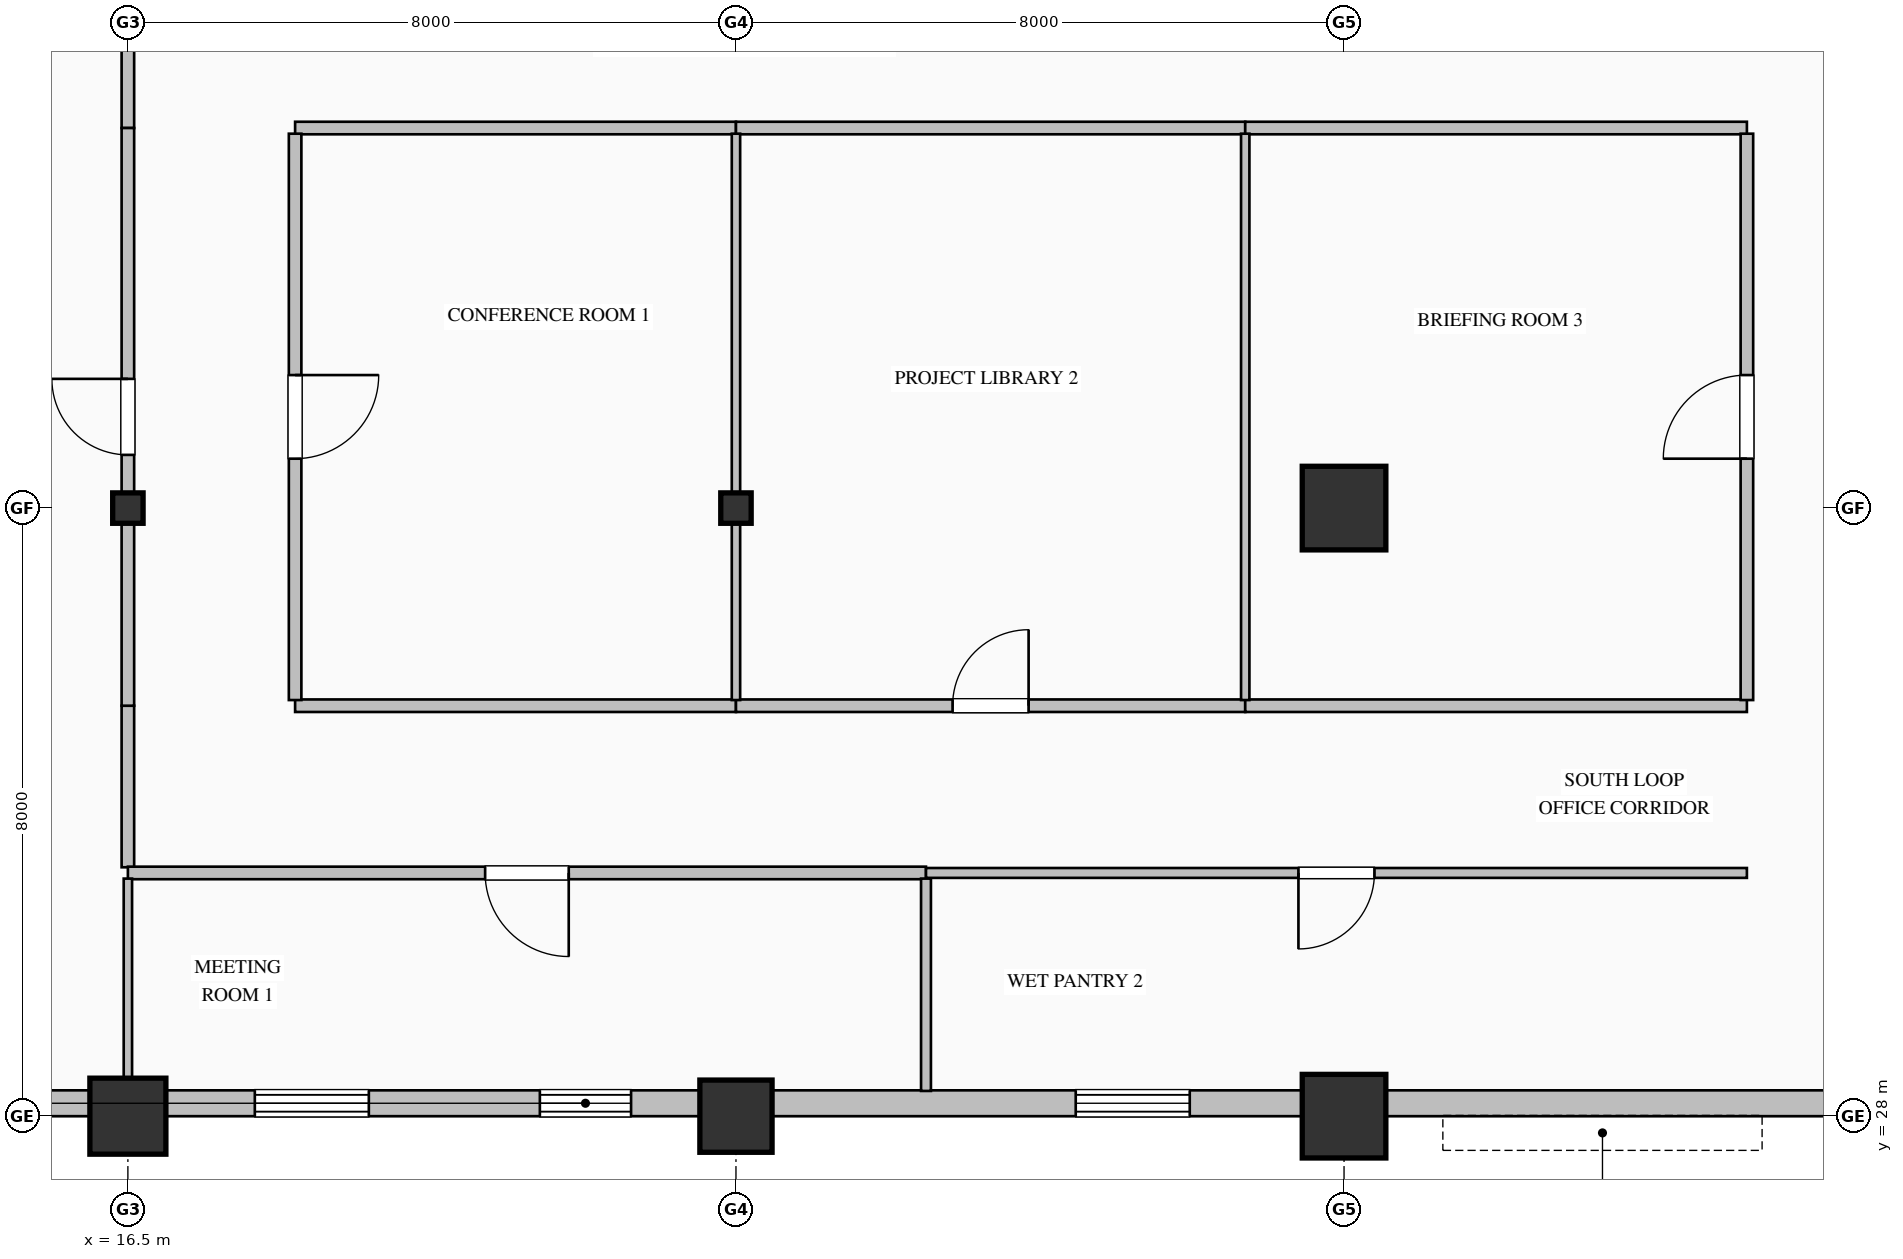
"""IFC4 building model, lengths in metres.
Left out: names, types, materials, properties, quantities, classifications, styles, units other than length and angle.
Written with IfcOpenShell. Run it as: python <this file> out.ifc"""

import sys

from ifc_helpers import new_model, si_unit, direction, frame, frame_2d, origin, origin_2d, place, context, subcontext, project, spatial, rectangle, hollow_rectangle, hollow_circle, i_section, extrude, element, fill, save


model = new_model("IFC4")
c1 = context("Model", 3, precision=1e-05, world=origin(), true_north=direction((0.0, 1.0)))
c2 = subcontext(c1, "Body", "Model", "MODEL_VIEW")
j1 = project(units=[si_unit("LENGTHUNIT", "METRE"), si_unit("PLANEANGLEUNIT", "RADIAN")], contexts=[c1])
p1 = place(None, origin())
s1 = spatial("IfcSite", under=j1, at=p1, CompositionType="ELEMENT")
p2 = place(p1, origin())
s2 = spatial("IfcBuilding", under=s1, at=p2, CompositionType="ELEMENT")
p3 = place(p2, frame((0.0, 0.0, 139.0)))
s3 = spatial("IfcBuildingStorey", under=s2, at=p3, CompositionType="ELEMENT", Elevation=139.0)
p4 = place(p3, frame((16.5, 28.0, 0.0), z_axis=(0.0, 0.0, 1.0), x_axis=(1.0, 0.0, 0.0)))
e1 = element("IfcColumn", 1, at=p4, inside=s3, PredefinedType="COLUMN", context=c2, shape_type="SweptSolid", body=[
    extrude(hollow_circle(Radius=0.5, WallThickness=0.036, at=origin_2d()), origin(), (0.0, 0.0, 1.0), 4.0),
])
p5 = place(p3, frame((16.5, 36.0, 0.0), z_axis=(0.0, 0.0, 1.0), x_axis=(1.0, 0.0, 0.0)))
e2 = element("IfcColumn", 2, at=p5, inside=s3, PredefinedType="COLUMN", context=c2, shape_type="SweptSolid", body=[
    extrude(i_section(OverallWidth=0.4, OverallDepth=0.4, WebThickness=0.013, FlangeThickness=0.021, FilletRadius=0.022, at=origin_2d()), origin(), (0.0, 0.0, 1.0), 4.0),
])
p6 = place(p3, frame((24.5, 28.0, 0.0), z_axis=(0.0, 0.0, 1.0), x_axis=(1.0, 0.0, 0.0)))
e3 = element("IfcColumn", 3, at=p6, inside=s3, PredefinedType="COLUMN", context=c2, shape_type="SweptSolid", body=[
    extrude(hollow_rectangle(XDim=0.95, YDim=0.95, WallThickness=0.036, at=origin_2d()), origin(), (0.0, 0.0, 1.0), 4.0),
])
p7 = place(p3, frame((24.5, 36.0, 0.0), z_axis=(0.0, 0.0, 1.0), x_axis=(1.0, 0.0, 0.0)))
e4 = element("IfcColumn", 4, at=p7, inside=s3, PredefinedType="COLUMN", context=c2, shape_type="SweptSolid", body=[
    extrude(i_section(OverallWidth=0.4, OverallDepth=0.4, WebThickness=0.013, FlangeThickness=0.021, FilletRadius=0.022, at=origin_2d()), origin(), (0.0, 0.0, 1.0), 4.0),
])
for number, where, z_axis, x_axis in (
    (5, (32.5, 28.0, 0.0), (0.0, 0.0, 1.0), (1.0, 0.0, 0.0)),
    (6, (32.5, 36.0, 0.0), (0.0, 0.0, 1.0), (1.0, 0.0, 0.0)),
):
    element("IfcColumn", number, at=place(p3, frame(where, z_axis=z_axis, x_axis=x_axis)), inside=s3, PredefinedType="COLUMN", context=c2, shape_type="SweptSolid", body=[
        extrude(hollow_rectangle(XDim=1.1, YDim=1.1, WallThickness=0.04, at=origin_2d()), origin(), (0.0, 0.0, 1.0), 4.0),
    ])
p8 = place(p3, frame((40.52, 28.17, 0.0), z_axis=(0.0, 0.0, 1.0), x_axis=(-1.0, 0.0, 0.0)))
e7 = element("IfcWall", 7, at=p8, inside=s3, PredefinedType="SOLIDWALL", context=c2, shape_type="SweptSolid", body=[
    extrude(rectangle(XDim=27.52, YDim=0.34, at=frame_2d((13.76, 0.0))), origin(), (0.0, 0.0, 1.0), 3.165),
])
p9 = place(p8, frame((10.05, 0.0, 0.85)))
e8 = element("IfcOpeningElement", 8, at=p9, cuts=e7, PredefinedType="OPENING", context=c2, shape_type="SweptSolid", body=[
    extrude(rectangle(XDim=1.5, YDim=1.95, at=frame_2d((0.75, 0.975))), frame((0.0, 0.18, 0.0), z_axis=(0.0, -1.0, 0.0), x_axis=(1.0, 0.0, 0.0)), (0.0, 0.0, 1.0), 0.36),
])
p10 = place(p8, frame((17.4, 0.0, 0.7)))
e9 = element("IfcOpeningElement", 9, at=p10, cuts=e7, PredefinedType="OPENING", context=c2, shape_type="SweptSolid", body=[
    extrude(rectangle(XDim=1.2, YDim=1.85, at=frame_2d((0.6, 0.925))), frame((0.0, 0.18, 0.0), z_axis=(0.0, -1.0, 0.0), x_axis=(1.0, 0.0, 0.0)), (0.0, 0.0, 1.0), 0.36),
])
p11 = place(p8, frame((20.85, 0.0, 0.85)))
e10 = element("IfcOpeningElement", 10, at=p11, cuts=e7, PredefinedType="OPENING", context=c2, shape_type="SweptSolid", body=[
    extrude(rectangle(XDim=1.5, YDim=1.95, at=frame_2d((0.75, 0.975))), frame((0.0, 0.18, 0.0), z_axis=(0.0, -1.0, 0.0), x_axis=(1.0, 0.0, 0.0)), (0.0, 0.0, 1.0), 0.36),
])
p12 = place(p3, frame((18.7, 33.4, 0.0), z_axis=(0.0, 0.0, 1.0), x_axis=(1.0, 0.0, 0.0)))
e11 = element("IfcWall", 11, at=p12, inside=s3, PredefinedType="PARTITIONING", context=c2, shape_type="SweptSolid", body=[
    extrude(rectangle(XDim=5.8, YDim=0.165, at=frame_2d((2.9, 0.0))), origin(), (0.0, 0.0, 1.0), 3.765),
])
p13 = place(p3, frame((24.5, 33.4, 0.0), z_axis=(0.0, 0.0, 1.0), x_axis=(1.0, 0.0, 0.0)))
e12 = element("IfcWall", 12, at=p13, inside=s3, PredefinedType="PARTITIONING", context=c2, shape_type="SweptSolid", body=[
    extrude(rectangle(XDim=6.7, YDim=0.165, at=frame_2d((3.35, 0.0))), origin(), (0.0, 0.0, 1.0), 3.765),
])
p14 = place(p13, frame((2.85, 0.0, 0.0)))
e13 = element("IfcOpeningElement", 13, at=p14, cuts=e12, PredefinedType="OPENING", context=c2, shape_type="SweptSolid", body=[
    extrude(rectangle(XDim=1.0, YDim=2.15, at=frame_2d((0.5, 1.075))), frame((0.0, 0.093, 0.0), z_axis=(0.0, -1.0, 0.0), x_axis=(1.0, 0.0, 0.0)), (0.0, 0.0, 1.0), 0.185),
])
p15 = place(p3, frame((31.2, 33.4, 0.0), z_axis=(0.0, 0.0, 1.0), x_axis=(1.0, 0.0, 0.0)))
e14 = element("IfcWall", 14, at=p15, inside=s3, PredefinedType="PARTITIONING", context=c2, shape_type="SweptSolid", body=[
    extrude(rectangle(XDim=6.6, YDim=0.165, at=frame_2d((3.3, 0.0))), origin(), (0.0, 0.0, 1.0), 3.765),
])
p16 = place(p3, frame((16.5, 31.274, 0.0), z_axis=(0.0, 0.0, 1.0), x_axis=(0.0, 1.0, 0.0)))
e15 = element("IfcWall", 15, at=p16, inside=s3, PredefinedType="PARTITIONING", context=c2, shape_type="SweptSolid", body=[
    extrude(rectangle(XDim=2.125, YDim=0.165, at=frame_2d((1.063, 0.0))), origin(), (0.0, 0.0, 1.0), 3.157),
])
p17 = place(p3, frame((27.0, 31.2, 0.0), z_axis=(0.0, 0.0, 1.0), x_axis=(-1.0, 0.0, 0.0)))
e16 = element("IfcWall", 16, at=p17, inside=s3, PredefinedType="PARTITIONING", context=c2, shape_type="SweptSolid", body=[
    extrude(rectangle(XDim=10.5, YDim=0.165, at=frame_2d((5.25, 0.0))), origin(), (0.0, 0.0, 1.0), 3.765),
])
p18 = place(p17, frame((4.7, 0.0, 0.0)))
e17 = element("IfcOpeningElement", 17, at=p18, cuts=e16, PredefinedType="OPENING", context=c2, shape_type="SweptSolid", body=[
    extrude(rectangle(XDim=1.1, YDim=2.2, at=frame_2d((0.55, 1.1))), frame((0.0, 0.093, 0.0), z_axis=(0.0, -1.0, 0.0), x_axis=(1.0, 0.0, 0.0)), (0.0, 0.0, 1.0), 0.185),
])
p19 = place(p3, frame((37.8, 31.2, 0.0), z_axis=(0.0, 0.0, 1.0), x_axis=(-1.0, 0.0, 0.0)))
e18 = element("IfcWall", 18, at=p19, inside=s3, PredefinedType="PARTITIONING", context=c2, shape_type="SweptSolid", body=[
    extrude(rectangle(XDim=10.8, YDim=0.13, at=frame_2d((5.4, 0.0))), origin(), (0.0, 0.0, 1.0), 3.765),
])
p20 = place(p19, frame((4.9, 0.0, 0.0)))
e19 = element("IfcOpeningElement", 19, at=p20, cuts=e18, PredefinedType="OPENING", context=c2, shape_type="SweptSolid", body=[
    extrude(rectangle(XDim=1.0, YDim=2.15, at=frame_2d((0.5, 1.075))), frame((0.0, 0.075, 0.0), z_axis=(0.0, -1.0, 0.0), x_axis=(1.0, 0.0, 0.0)), (0.0, 0.0, 1.0), 0.15),
])
p21 = place(p3, frame((24.5, 41.0, 0.0), z_axis=(0.0, 0.0, 1.0), x_axis=(-1.0, 0.0, 0.0)))
e20 = element("IfcWall", 20, at=p21, inside=s3, PredefinedType="PARTITIONING", context=c2, shape_type="SweptSolid", body=[
    extrude(rectangle(XDim=5.8, YDim=0.165, at=frame_2d((2.9, 0.0))), origin(), (0.0, 0.0, 1.0), 3.765),
])
p22 = place(p3, frame((31.2, 41.0, 0.0), z_axis=(0.0, 0.0, 1.0), x_axis=(-1.0, 0.0, 0.0)))
e21 = element("IfcWall", 21, at=p22, inside=s3, PredefinedType="PARTITIONING", context=c2, shape_type="SweptSolid", body=[
    extrude(rectangle(XDim=6.7, YDim=0.165, at=frame_2d((3.35, 0.0))), origin(), (0.0, 0.0, 1.0), 3.765),
])
p23 = place(p3, frame((37.8, 41.0, 0.0), z_axis=(0.0, 0.0, 1.0), x_axis=(-1.0, 0.0, 0.0)))
e22 = element("IfcWall", 22, at=p23, inside=s3, PredefinedType="PARTITIONING", context=c2, shape_type="SweptSolid", body=[
    extrude(rectangle(XDim=6.6, YDim=0.165, at=frame_2d((3.3, 0.0))), origin(), (0.0, 0.0, 1.0), 3.765),
])
p24 = place(p3, frame((16.5, 41.0, 0.0), z_axis=(0.0, 0.0, 1.0), x_axis=(0.0, 1.0, 0.0)))
e23 = element("IfcWall", 23, at=p24, inside=s3, PredefinedType="PARTITIONING", context=c2, shape_type="SweptSolid", body=[
    extrude(rectangle(XDim=2.125, YDim=0.165, at=frame_2d((1.063, 0.0))), origin(), (0.0, 0.0, 1.0), 3.157),
])
p25 = place(p3, frame((18.7, 40.926, 0.0), z_axis=(0.0, 0.0, 1.0), x_axis=(0.0, -1.0, 0.0)))
e24 = element("IfcWall", 24, at=p25, inside=s3, PredefinedType="PARTITIONING", context=c2, shape_type="SweptSolid", body=[
    extrude(rectangle(XDim=7.451, YDim=0.165, at=frame_2d((3.726, 0.0))), origin(), (0.0, 0.0, 1.0), 3.765),
])
p26 = place(p25, frame((3.176, 0.0, 0.0)))
e25 = element("IfcOpeningElement", 25, at=p26, cuts=e24, PredefinedType="OPENING", context=c2, shape_type="SweptSolid", body=[
    extrude(rectangle(XDim=1.1, YDim=2.2, at=frame_2d((0.55, 1.1))), frame((0.0, 0.093, 0.0), z_axis=(0.0, -1.0, 0.0), x_axis=(1.0, 0.0, 0.0)), (0.0, 0.0, 1.0), 0.185),
])
p27 = place(p3, frame((16.5, 33.4, 0.0), z_axis=(0.0, 0.0, 1.0), x_axis=(0.0, 1.0, 0.0)))
e26 = element("IfcWall", 26, at=p27, inside=s3, PredefinedType="PARTITIONING", context=c2, shape_type="SweptSolid", body=[
    extrude(rectangle(XDim=7.6, YDim=0.165, at=frame_2d((3.8, 0.0))), origin(), (0.0, 0.0, 1.0), 3.157),
])
p28 = place(p27, frame((3.3, 0.0, 0.0)))
e27 = element("IfcOpeningElement", 27, at=p28, cuts=e26, PredefinedType="OPENING", context=c2, shape_type="SweptSolid", body=[
    extrude(rectangle(XDim=1.0, YDim=2.15, at=frame_2d((0.5, 1.075))), frame((0.0, 0.093, 0.0), z_axis=(0.0, -1.0, 0.0), x_axis=(1.0, 0.0, 0.0)), (0.0, 0.0, 1.0), 0.185),
])
p29 = place(p3, frame((37.8, 33.475, 0.0), z_axis=(0.0, 0.0, 1.0), x_axis=(0.0, 1.0, 0.0)))
e28 = element("IfcWall", 28, at=p29, inside=s3, PredefinedType="PARTITIONING", context=c2, shape_type="SweptSolid", body=[
    extrude(rectangle(XDim=7.451, YDim=0.165, at=frame_2d((3.726, 0.0))), origin(), (0.0, 0.0, 1.0), 3.765),
])
p30 = place(p29, frame((3.176, 0.0, 0.0)))
e29 = element("IfcOpeningElement", 29, at=p30, cuts=e28, PredefinedType="OPENING", context=c2, shape_type="SweptSolid", body=[
    extrude(rectangle(XDim=1.1, YDim=2.2, at=frame_2d((0.55, 1.1))), frame((0.0, 0.093, 0.0), z_axis=(0.0, -1.0, 0.0), x_axis=(1.0, 0.0, 0.0)), (0.0, 0.0, 1.0), 0.185),
])
p31 = place(p3, frame((24.5, 40.926, 0.0), z_axis=(0.0, 0.0, 1.0), x_axis=(0.0, -1.0, 0.0)))
e30 = element("IfcWall", 30, at=p31, inside=s3, PredefinedType="MOVABLE", context=c2, shape_type="SweptSolid", body=[
    extrude(rectangle(XDim=7.451, YDim=0.11, at=frame_2d((3.726, 0.0))), origin(), (0.0, 0.0, 1.0), 3.157),
])
p32 = place(p3, frame((31.2, 40.926, 0.0), z_axis=(0.0, 0.0, 1.0), x_axis=(0.0, -1.0, 0.0)))
e31 = element("IfcWall", 31, at=p32, inside=s3, PredefinedType="MOVABLE", context=c2, shape_type="SweptSolid", body=[
    extrude(rectangle(XDim=7.451, YDim=0.11, at=frame_2d((3.726, 0.0))), origin(), (0.0, 0.0, 1.0), 3.765),
])
p33 = place(p3, frame((16.5, 31.125, 0.0), z_axis=(0.0, 0.0, 1.0), x_axis=(0.0, -1.0, 0.0)))
e32 = element("IfcWall", 32, at=p33, inside=s3, PredefinedType="MOVABLE", context=c2, shape_type="SweptSolid", body=[
    extrude(rectangle(XDim=2.793, YDim=0.11, at=frame_2d((1.397, 0.0))), origin(), (0.0, 0.0, 1.0), 3.157),
])
p34 = place(p3, frame((27.0, 31.125, 0.0), z_axis=(0.0, 0.0, 1.0), x_axis=(0.0, -1.0, 0.0)))
e33 = element("IfcWall", 33, at=p34, inside=s3, PredefinedType="PARTITIONING", context=c2, shape_type="SweptSolid", body=[
    extrude(rectangle(XDim=2.793, YDim=0.13, at=frame_2d((1.397, 0.0))), origin(), (0.0, 0.0, 1.0), 3.765),
])
p35 = place(p9, origin())
e34 = element("IfcWindow", 34, at=p35, inside=s3, PartitioningType="DOUBLE_PANEL_VERTICAL", PredefinedType="WINDOW", context=c2, shape_type="SweptSolid", body=[
    extrude(rectangle(XDim=1.5, YDim=1.95, at=frame_2d((0.75, 0.975))), frame((0.0, 0.15, 0.0), z_axis=(0.0, -1.0, 0.0), x_axis=(1.0, 0.0, 0.0)), (0.0, 0.0, 1.0), 0.06),
])
fill(e8, e34)
p36 = place(p10, origin())
e35 = element("IfcWindow", 35, at=p36, inside=s3, PartitioningType="DOUBLE_PANEL_VERTICAL", PredefinedType="WINDOW", context=c2, shape_type="SweptSolid", body=[
    extrude(rectangle(XDim=1.2, YDim=1.85, at=frame_2d((0.6, 0.925))), frame((0.0, 0.15, 0.0), z_axis=(0.0, -1.0, 0.0), x_axis=(1.0, 0.0, 0.0)), (0.0, 0.0, 1.0), 0.06),
])
fill(e9, e35)
p37 = place(p11, origin())
e36 = element("IfcWindow", 36, at=p37, inside=s3, PartitioningType="DOUBLE_PANEL_VERTICAL", PredefinedType="WINDOW", context=c2, shape_type="SweptSolid", body=[
    extrude(rectangle(XDim=1.5, YDim=1.95, at=frame_2d((0.75, 0.975))), frame((0.0, 0.15, 0.0), z_axis=(0.0, -1.0, 0.0), x_axis=(1.0, 0.0, 0.0)), (0.0, 0.0, 1.0), 0.06),
])
fill(e10, e36)
p38 = place(p26, origin())
e37 = element("IfcDoor", 37, at=p38, inside=s3, OperationType="SINGLE_SWING_LEFT", PredefinedType="DOOR", context=c2, shape_type="SweptSolid", body=[
    extrude(rectangle(XDim=1.1, YDim=2.2, at=frame_2d((0.55, 1.1))), frame((0.0, 0.025, 0.0), z_axis=(0.0, -1.0, 0.0), x_axis=(1.0, 0.0, 0.0)), (0.0, 0.0, 1.0), 0.05),
])
fill(e25, e37)
p39 = place(p14, origin())
e38 = element("IfcDoor", 38, at=p39, inside=s3, OperationType="SINGLE_SWING_RIGHT", PredefinedType="DOOR", context=c2, shape_type="SweptSolid", body=[
    extrude(rectangle(XDim=1.0, YDim=2.15, at=frame_2d((0.5, 1.075))), frame((0.0, 0.025, 0.0), z_axis=(0.0, -1.0, 0.0), x_axis=(1.0, 0.0, 0.0)), (0.0, 0.0, 1.0), 0.05),
])
fill(e13, e38)
p40 = place(p30, origin())
e39 = element("IfcDoor", 39, at=p40, inside=s3, OperationType="SINGLE_SWING_LEFT", PredefinedType="DOOR", context=c2, shape_type="SweptSolid", body=[
    extrude(rectangle(XDim=1.1, YDim=2.2, at=frame_2d((0.55, 1.1))), frame((0.0, 0.025, 0.0), z_axis=(0.0, -1.0, 0.0), x_axis=(1.0, 0.0, 0.0)), (0.0, 0.0, 1.0), 0.05),
])
fill(e29, e39)
p41 = place(p28, origin())
e40 = element("IfcDoor", 40, at=p41, inside=s3, OperationType="SINGLE_SWING_RIGHT", PredefinedType="DOOR", context=c2, shape_type="SweptSolid", body=[
    extrude(rectangle(XDim=1.0, YDim=2.15, at=frame_2d((0.5, 1.075))), frame((0.0, 0.025, 0.0), z_axis=(0.0, -1.0, 0.0), x_axis=(1.0, 0.0, 0.0)), (0.0, 0.0, 1.0), 0.05),
])
fill(e27, e40)
p42 = place(p18, origin())
e41 = element("IfcDoor", 41, at=p42, inside=s3, OperationType="SINGLE_SWING_LEFT", PredefinedType="DOOR", context=c2, shape_type="SweptSolid", body=[
    extrude(rectangle(XDim=1.1, YDim=2.2, at=frame_2d((0.55, 1.1))), frame((0.0, 0.025, 0.0), z_axis=(0.0, -1.0, 0.0), x_axis=(1.0, 0.0, 0.0)), (0.0, 0.0, 1.0), 0.05),
])
fill(e17, e41)
p43 = place(p20, origin())
e42 = element("IfcDoor", 42, at=p43, inside=s3, OperationType="SINGLE_SWING_RIGHT", PredefinedType="DOOR", context=c2, shape_type="SweptSolid", body=[
    extrude(rectangle(XDim=1.0, YDim=2.15, at=frame_2d((0.5, 1.075))), frame((0.0, 0.025, 0.0), z_axis=(0.0, -1.0, 0.0), x_axis=(1.0, 0.0, 0.0)), (0.0, 0.0, 1.0), 0.05),
])
fill(e19, e42)
save(model, sys.argv[1])
